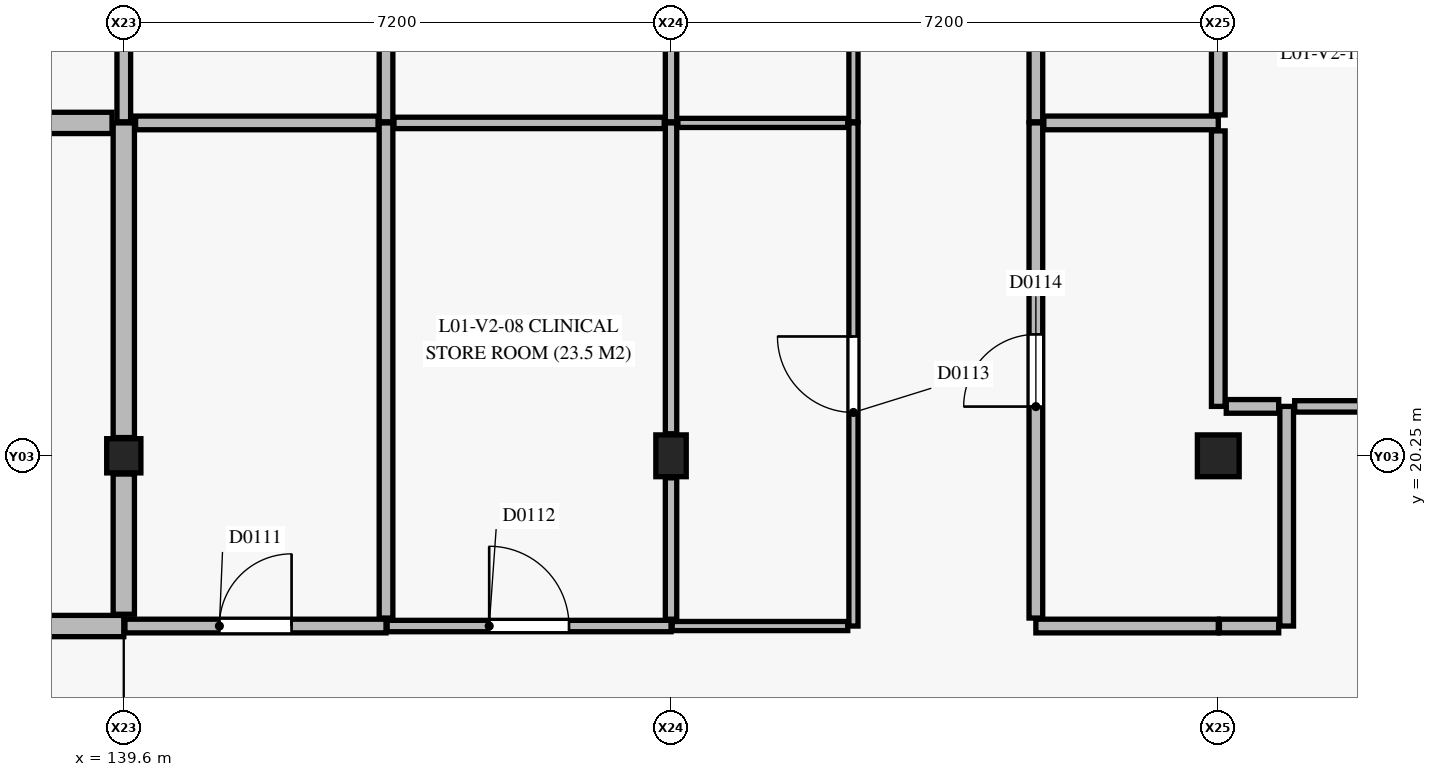
"""IFC4 building model, lengths in metres.
Left out: names, types, materials, properties, quantities, classifications, styles, units other than length and angle.
Written with IfcOpenShell. Run it as: python <this file> out.ifc"""

import sys

from ifc_helpers import new_model, si_unit, direction, frame, frame_2d, origin, origin_2d, place, context, subcontext, project, spatial, rectangle, extrude, element, fill, save


model = new_model("IFC4")
c1 = context("Model", 3, precision=1e-05, world=origin(), true_north=direction((0.0, 1.0)))
c2 = subcontext(c1, "Body", "Model", "MODEL_VIEW")
j1 = project(units=[si_unit("LENGTHUNIT", "METRE"), si_unit("PLANEANGLEUNIT", "RADIAN")], contexts=[c1])
p1 = place(None, origin())
s1 = spatial("IfcSite", under=j1, at=p1, CompositionType="ELEMENT")
p2 = place(p1, origin())
s2 = spatial("IfcBuilding", under=s1, at=p2, CompositionType="ELEMENT")
p3 = place(p2, frame((0.0, 0.0, 4.8)))
s3 = spatial("IfcBuildingStorey", under=s2, at=p3, CompositionType="ELEMENT", Elevation=4.8)
p4 = place(p3, frame((139.6, 20.25, 0.0), z_axis=(0.0, 0.0, 1.0), x_axis=(1.0, 0.0, 0.0)))
e1 = element("IfcColumn", 1, at=p4, inside=s3, PredefinedType="COLUMN", context=c2, shape_type="SweptSolid", body=[
    extrude(rectangle(XDim=0.45, YDim=0.45, at=origin_2d()), origin(), (0.0, 0.0, 1.0), 4.05),
])
p5 = place(p3, frame((146.8, 20.25, 0.0), z_axis=(0.0, 0.0, 1.0), x_axis=(1.0, 0.0, 0.0)))
e2 = element("IfcColumn", 2, at=p5, inside=s3, PredefinedType="COLUMN", context=c2, shape_type="SweptSolid", body=[
    extrude(rectangle(XDim=0.4, YDim=0.55, at=origin_2d()), origin(), (0.0, 0.0, 1.0), 4.05),
])
p6 = place(p3, frame((154.0, 20.25, 0.0), z_axis=(0.0, 0.0, 1.0), x_axis=(1.0, 0.0, 0.0)))
e3 = element("IfcColumn", 3, at=p6, inside=s3, PredefinedType="COLUMN", context=c2, shape_type="SweptSolid", body=[
    extrude(rectangle(XDim=0.55, YDim=0.55, at=origin_2d()), origin(), (0.0, 0.0, 1.0), 4.05),
])
p7 = place(p3, frame((132.4, 18.01, 0.0), z_axis=(0.0, 0.0, 1.0), x_axis=(1.0, 0.0, 0.0)))
e4 = element("IfcWall", 4, at=p7, inside=s3, PredefinedType="PARTITIONING", context=c2, shape_type="SweptSolid", body=[
    extrude(rectangle(XDim=7.2, YDim=0.28, at=frame_2d((3.6, 0.0))), origin(), (0.0, 0.0, 1.0), 3.95),
])
p8 = place(p7, frame((2.925, 0.0, 0.0)))
e5 = element("IfcOpeningElement", 5, at=p8, cuts=e4, PredefinedType="OPENING", context=c2, shape_type="SweptSolid", body=[
    extrude(rectangle(XDim=1.35, YDim=2.2, at=frame_2d((0.675, 1.1))), frame((0.0, 0.15, 0.0), z_axis=(0.0, -1.0, 0.0), x_axis=(1.0, 0.0, 0.0)), (0.0, 0.0, 1.0), 0.3),
])
p9 = place(p3, frame((139.615, 18.01, 0.0), z_axis=(0.0, 0.0, 1.0), x_axis=(1.0, 0.0, 0.0)))
e6 = element("IfcWall", 6, at=p9, inside=s3, PredefinedType="PLUMBINGWALL", context=c2, shape_type="SweptSolid", body=[
    extrude(rectangle(XDim=3.435, YDim=0.18, at=frame_2d((1.718, 0.0))), origin(), (0.0, 0.0, 1.0), 3.95),
])
p10 = place(p9, frame((1.242, 0.0, 0.0)))
e7 = element("IfcOpeningElement", 7, at=p10, cuts=e6, PredefinedType="OPENING", context=c2, shape_type="SweptSolid", body=[
    extrude(rectangle(XDim=0.95, YDim=2.1, at=frame_2d((0.475, 1.05))), frame((0.0, 0.1, 0.0), z_axis=(0.0, -1.0, 0.0), x_axis=(1.0, 0.0, 0.0)), (0.0, 0.0, 1.0), 0.2),
])
p11 = place(p3, frame((151.6, 18.01, 0.0), z_axis=(0.0, 0.0, 1.0), x_axis=(1.0, 0.0, 0.0)))
e8 = element("IfcWall", 8, at=p11, inside=s3, PredefinedType="PLUMBINGWALL", context=c2, shape_type="SweptSolid", body=[
    extrude(rectangle(XDim=2.4, YDim=0.18, at=frame_2d((1.2, 0.0))), origin(), (0.0, 0.0, 1.0), 3.95),
])
p12 = place(p3, frame((151.6, 18.115, 0.0), z_axis=(0.0, 0.0, 1.0), x_axis=(0.0, 1.0, 0.0)))
e9 = element("IfcWall", 9, at=p12, inside=s3, PredefinedType="PLUMBINGWALL", context=c2, shape_type="SweptSolid", body=[
    extrude(rectangle(XDim=6.515, YDim=0.18, at=frame_2d((3.257, 0.0))), origin(), (0.0, 0.0, 1.0), 3.37),
])
p13 = place(p12, frame((2.782, 0.0, 0.0)))
e10 = element("IfcOpeningElement", 10, at=p13, cuts=e9, PredefinedType="OPENING", context=c2, shape_type="SweptSolid", body=[
    extrude(rectangle(XDim=0.95, YDim=2.1, at=frame_2d((0.475, 1.05))), frame((0.0, 0.1, 0.0), z_axis=(0.0, -1.0, 0.0), x_axis=(1.0, 0.0, 0.0)), (0.0, 0.0, 1.0), 0.2),
])
p14 = place(p3, frame((154.9, 18.01, 0.0), z_axis=(0.0, 0.0, 1.0), x_axis=(0.0, 1.0, 0.0)))
e11 = element("IfcWall", 11, at=p14, inside=s3, PredefinedType="PLUMBINGWALL", context=c2, shape_type="SweptSolid", body=[
    extrude(rectangle(XDim=2.89, YDim=0.18, at=frame_2d((1.445, 0.0))), origin(), (0.0, 0.0, 1.0), 3.95),
])
p15 = place(p3, frame((154.015, 18.01, 0.0), z_axis=(0.0, 0.0, 1.0), x_axis=(1.0, 0.0, 0.0)))
e12 = element("IfcWall", 12, at=p15, inside=s3, PredefinedType="PLUMBINGWALL", context=c2, shape_type="SweptSolid", body=[
    extrude(rectangle(XDim=0.78, YDim=0.18, at=frame_2d((0.39, 0.0))), origin(), (0.0, 0.0, 1.0), 3.95),
])
p16 = place(p3, frame((151.6, 24.645, 0.0), z_axis=(0.0, 0.0, 1.0), x_axis=(0.0, 1.0, 0.0)))
e13 = element("IfcWall", 13, at=p16, inside=s3, PredefinedType="PLUMBINGWALL", context=c2, shape_type="SweptSolid", body=[
    extrude(rectangle(XDim=5.905, YDim=0.18, at=frame_2d((2.953, 0.0))), origin(), (0.0, 0.0, 1.0), 3.22),
])
p17 = place(p16, frame((2.478, 0.0, 0.0)))
e14 = element("IfcOpeningElement", 14, at=p17, cuts=e13, PredefinedType="OPENING", context=c2, shape_type="SweptSolid", body=[
    extrude(rectangle(XDim=0.95, YDim=2.1, at=frame_2d((0.475, 1.05))), frame((0.0, 0.1, 0.0), z_axis=(0.0, -1.0, 0.0), x_axis=(1.0, 0.0, 0.0)), (0.0, 0.0, 1.0), 0.2),
])
p18 = place(p3, frame((143.065, 18.01, 0.0), z_axis=(0.0, 0.0, 1.0), x_axis=(1.0, 0.0, 0.0)))
e15 = element("IfcWall", 15, at=p18, inside=s3, PredefinedType="PARTITIONING", context=c2, shape_type="SweptSolid", body=[
    extrude(rectangle(XDim=3.735, YDim=0.15, at=frame_2d((1.868, 0.0))), origin(), (0.0, 0.0, 1.0), 3.95),
])
p19 = place(p18, frame((1.343, 0.0, 0.0)))
e16 = element("IfcOpeningElement", 16, at=p19, cuts=e15, PredefinedType="OPENING", context=c2, shape_type="SweptSolid", body=[
    extrude(rectangle(XDim=1.05, YDim=2.15, at=frame_2d((0.525, 1.075))), frame((0.0, 0.085, 0.0), z_axis=(0.0, -1.0, 0.0), x_axis=(1.0, 0.0, 0.0)), (0.0, 0.0, 1.0), 0.17),
])
p20 = place(p3, frame((155.005, 20.9, 0.0), z_axis=(0.0, 0.0, 1.0), x_axis=(1.0, 0.0, 0.0)))
e17 = element("IfcWall", 17, at=p20, inside=s3, PredefinedType="PARTITIONING", context=c2, shape_type="SweptSolid", body=[
    extrude(rectangle(XDim=2.195, YDim=0.15, at=frame_2d((1.098, 0.0))), origin(), (0.0, 0.0, 1.0), 3.95),
])
p21 = place(p3, frame((149.2, 18.01, 0.0), z_axis=(0.0, 0.0, 1.0), x_axis=(0.0, 1.0, 0.0)))
e18 = element("IfcWall", 18, at=p21, inside=s3, PredefinedType="PARTITIONING", context=c2, shape_type="SweptSolid", body=[
    extrude(rectangle(XDim=6.62, YDim=0.12, at=frame_2d((3.31, 0.0))), origin(), (0.0, 0.0, 1.0), 3.37),
])
p22 = place(p21, frame((2.81, 0.0, 0.0)))
e19 = element("IfcOpeningElement", 19, at=p22, cuts=e18, PredefinedType="OPENING", context=c2, shape_type="SweptSolid", body=[
    extrude(rectangle(XDim=1.0, YDim=2.15, at=frame_2d((0.5, 1.075))), frame((0.0, 0.07, 0.0), z_axis=(0.0, -1.0, 0.0), x_axis=(1.0, 0.0, 0.0)), (0.0, 0.0, 1.0), 0.14),
])
p23 = place(p3, frame((146.815, 18.01, 0.0), z_axis=(0.0, 0.0, 1.0), x_axis=(1.0, 0.0, 0.0)))
e20 = element("IfcWall", 20, at=p23, inside=s3, PredefinedType="PARTITIONING", context=c2, shape_type="SweptSolid", body=[
    extrude(rectangle(XDim=2.31, YDim=0.12, at=frame_2d((1.155, 0.0))), origin(), (0.0, 0.0, 1.0), 3.95),
])
p24 = place(p3, frame((149.2, 24.645, 0.0), z_axis=(0.0, 0.0, 1.0), x_axis=(0.0, 1.0, 0.0)))
e21 = element("IfcWall", 21, at=p24, inside=s3, PredefinedType="PARTITIONING", context=c2, shape_type="SweptSolid", body=[
    extrude(rectangle(XDim=5.905, YDim=0.12, at=frame_2d((2.953, 0.0))), origin(), (0.0, 0.0, 1.0), 3.22),
])
p25 = place(p24, frame((2.153, 0.0, 0.0)))
e22 = element("IfcOpeningElement", 22, at=p25, cuts=e21, PredefinedType="OPENING", context=c2, shape_type="SweptSolid", body=[
    extrude(rectangle(XDim=1.6, YDim=2.25, at=frame_2d((0.8, 1.125))), frame((0.0, 0.07, 0.0), z_axis=(0.0, -1.0, 0.0), x_axis=(1.0, 0.0, 0.0)), (0.0, 0.0, 1.0), 0.14),
])
p26 = place(p3, frame((139.6, 18.165, 0.0), z_axis=(0.0, 0.0, 1.0), x_axis=(0.0, 1.0, 0.0)))
e23 = element("IfcWall", 23, at=p26, inside=s3, PredefinedType="PARTITIONING", context=c2, shape_type="SweptSolid", body=[
    extrude(rectangle(XDim=1.845, YDim=0.28, at=frame_2d((0.922, 0.0))), origin(), (0.0, 0.0, 1.0), 3.95),
])
p27 = place(p3, frame((139.6, 20.49, 0.0), z_axis=(0.0, 0.0, 1.0), x_axis=(0.0, 1.0, 0.0)))
e24 = element("IfcWall", 24, at=p27, inside=s3, PredefinedType="PARTITIONING", context=c2, shape_type="SweptSolid", body=[
    extrude(rectangle(XDim=4.14, YDim=0.28, at=frame_2d((2.07, 0.0))), origin(), (0.0, 0.0, 1.0), 3.95),
])
p28 = place(p3, frame((132.555, 24.63, 0.0), z_axis=(0.0, 0.0, 1.0), x_axis=(1.0, 0.0, 0.0)))
e25 = element("IfcWall", 25, at=p28, inside=s3, PredefinedType="PARTITIONING", context=c2, shape_type="SweptSolid", body=[
    extrude(rectangle(XDim=6.89, YDim=0.28, at=frame_2d((3.445, 0.0))), origin(), (0.0, 0.0, 1.0), 3.95),
])
p29 = place(p3, frame((143.05, 18.115, 0.0), z_axis=(0.0, 0.0, 1.0), x_axis=(0.0, 1.0, 0.0)))
e26 = element("IfcWall", 26, at=p29, inside=s3, PredefinedType="PLUMBINGWALL", context=c2, shape_type="SweptSolid", body=[
    extrude(rectangle(XDim=6.515, YDim=0.18, at=frame_2d((3.257, 0.0))), origin(), (0.0, 0.0, 1.0), 3.37),
])
p30 = place(p3, frame((139.755, 24.63, 0.0), z_axis=(0.0, 0.0, 1.0), x_axis=(1.0, 0.0, 0.0)))
e27 = element("IfcWall", 27, at=p30, inside=s3, PredefinedType="PLUMBINGWALL", context=c2, shape_type="SweptSolid", body=[
    extrude(rectangle(XDim=3.19, YDim=0.18, at=frame_2d((1.595, 0.0))), origin(), (0.0, 0.0, 1.0), 3.95),
])
p31 = place(p3, frame((151.705, 24.63, 0.0), z_axis=(0.0, 0.0, 1.0), x_axis=(1.0, 0.0, 0.0)))
e28 = element("IfcWall", 28, at=p31, inside=s3, PredefinedType="PLUMBINGWALL", context=c2, shape_type="SweptSolid", body=[
    extrude(rectangle(XDim=2.295, YDim=0.18, at=frame_2d((1.147, 0.0))), origin(), (0.0, 0.0, 1.0), 3.95),
])
p32 = place(p3, frame((154.0, 20.9, 0.0), z_axis=(0.0, 0.0, 1.0), x_axis=(0.0, 1.0, 0.0)))
e29 = element("IfcWall", 29, at=p32, inside=s3, PredefinedType="PLUMBINGWALL", context=c2, shape_type="SweptSolid", body=[
    extrude(rectangle(XDim=3.625, YDim=0.18, at=frame_2d((1.812, 0.0))), origin(), (0.0, 0.0, 1.0), 3.95),
])
p33 = place(p3, frame((154.105, 20.9, 0.0), z_axis=(0.0, 0.0, 1.0), x_axis=(1.0, 0.0, 0.0)))
e30 = element("IfcWall", 30, at=p33, inside=s3, PredefinedType="PLUMBINGWALL", context=c2, shape_type="SweptSolid", body=[
    extrude(rectangle(XDim=0.69, YDim=0.18, at=frame_2d((0.345, 0.0))), origin(), (0.0, 0.0, 1.0), 3.95),
])
p34 = place(p3, frame((154.0, 24.735, 0.0), z_axis=(0.0, 0.0, 1.0), x_axis=(0.0, 1.0, 0.0)))
e31 = element("IfcWall", 31, at=p34, inside=s3, PredefinedType="PLUMBINGWALL", context=c2, shape_type="SweptSolid", body=[
    extrude(rectangle(XDim=2.45, YDim=0.18, at=frame_2d((1.225, 0.0))), origin(), (0.0, 0.0, 1.0), 3.95),
])
p35 = place(p3, frame((139.6, 24.645, 0.0), z_axis=(0.0, 0.0, 1.0), x_axis=(0.0, 1.0, 0.0)))
e32 = element("IfcWall", 32, at=p35, inside=s3, PredefinedType="PLUMBINGWALL", context=c2, shape_type="SweptSolid", body=[
    extrude(rectangle(XDim=2.59, YDim=0.18, at=frame_2d((1.295, 0.0))), origin(), (0.0, 0.0, 1.0), 3.95),
])
p36 = place(p3, frame((143.05, 24.645, 0.0), z_axis=(0.0, 0.0, 1.0), x_axis=(0.0, 1.0, 0.0)))
e33 = element("IfcWall", 33, at=p36, inside=s3, PredefinedType="PLUMBINGWALL", context=c2, shape_type="SweptSolid", body=[
    extrude(rectangle(XDim=5.8, YDim=0.18, at=frame_2d((2.9, 0.0))), origin(), (0.0, 0.0, 1.0), 3.47),
])
p37 = place(p3, frame((146.8, 18.1, 0.0), z_axis=(0.0, 0.0, 1.0), x_axis=(0.0, 1.0, 0.0)))
e34 = element("IfcWall", 34, at=p37, inside=s3, PredefinedType="PARTITIONING", context=c2, shape_type="SweptSolid", body=[
    extrude(rectangle(XDim=1.86, YDim=0.15, at=frame_2d((0.93, 0.0))), origin(), (0.0, 0.0, 1.0), 3.95),
])
p38 = place(p3, frame((146.8, 20.54, 0.0), z_axis=(0.0, 0.0, 1.0), x_axis=(0.0, 1.0, 0.0)))
e35 = element("IfcWall", 35, at=p38, inside=s3, PredefinedType="PARTITIONING", context=c2, shape_type="SweptSolid", body=[
    extrude(rectangle(XDim=4.09, YDim=0.15, at=frame_2d((2.045, 0.0))), origin(), (0.0, 0.0, 1.0), 3.95),
])
p39 = place(p3, frame((143.155, 24.63, 0.0), z_axis=(0.0, 0.0, 1.0), x_axis=(1.0, 0.0, 0.0)))
e36 = element("IfcWall", 36, at=p39, inside=s3, PredefinedType="PARTITIONING", context=c2, shape_type="SweptSolid", body=[
    extrude(rectangle(XDim=3.555, YDim=0.15, at=frame_2d((1.777, 0.0))), origin(), (0.0, 0.0, 1.0), 3.95),
])
p40 = place(p3, frame((146.8, 24.645, 0.0), z_axis=(0.0, 0.0, 1.0), x_axis=(0.0, 1.0, 0.0)))
e37 = element("IfcWall", 37, at=p40, inside=s3, PredefinedType="PARTITIONING", context=c2, shape_type="SweptSolid", body=[
    extrude(rectangle(XDim=2.415, YDim=0.15, at=frame_2d((1.208, 0.0))), origin(), (0.0, 0.0, 1.0), 3.95),
])
p41 = place(p3, frame((146.89, 24.63, 0.0), z_axis=(0.0, 0.0, 1.0), x_axis=(1.0, 0.0, 0.0)))
e38 = element("IfcWall", 38, at=p41, inside=s3, PredefinedType="PARTITIONING", context=c2, shape_type="SweptSolid", body=[
    extrude(rectangle(XDim=2.235, YDim=0.12, at=frame_2d((1.118, 0.0))), origin(), (0.0, 0.0, 1.0), 3.95),
])
p42 = place(p10, origin())
e39 = element("IfcDoor", 39, at=p42, inside=s3, OperationType="SINGLE_SWING_RIGHT", PredefinedType="DOOR", context=c2, shape_type="SweptSolid", body=[
    extrude(rectangle(XDim=0.95, YDim=2.1, at=frame_2d((0.475, 1.05))), frame((0.0, 0.025, 0.0), z_axis=(0.0, -1.0, 0.0), x_axis=(1.0, 0.0, 0.0)), (0.0, 0.0, 1.0), 0.05),
])
fill(e7, e39)
p43 = place(p19, origin())
e40 = element("IfcDoor", 40, at=p43, inside=s3, OperationType="SINGLE_SWING_LEFT", PredefinedType="DOOR", context=c2, shape_type="SweptSolid", body=[
    extrude(rectangle(XDim=1.05, YDim=2.15, at=frame_2d((0.525, 1.075))), frame((0.0, 0.025, 0.0), z_axis=(0.0, -1.0, 0.0), x_axis=(1.0, 0.0, 0.0)), (0.0, 0.0, 1.0), 0.05),
])
fill(e16, e40)
p44 = place(p22, origin())
e41 = element("IfcDoor", 41, at=p44, inside=s3, OperationType="SINGLE_SWING_RIGHT", PredefinedType="DOOR", context=c2, shape_type="SweptSolid", body=[
    extrude(rectangle(XDim=1.0, YDim=2.15, at=frame_2d((0.5, 1.075))), frame((0.0, 0.025, 0.0), z_axis=(0.0, -1.0, 0.0), x_axis=(1.0, 0.0, 0.0)), (0.0, 0.0, 1.0), 0.05),
])
fill(e19, e41)
p45 = place(p13, origin())
e42 = element("IfcDoor", 42, at=p45, inside=s3, OperationType="SINGLE_SWING_LEFT", PredefinedType="DOOR", context=c2, shape_type="SweptSolid", body=[
    extrude(rectangle(XDim=0.95, YDim=2.1, at=frame_2d((0.475, 1.05))), frame((0.0, 0.025, 0.0), z_axis=(0.0, -1.0, 0.0), x_axis=(1.0, 0.0, 0.0)), (0.0, 0.0, 1.0), 0.05),
])
fill(e10, e42)
save(model, sys.argv[1])
